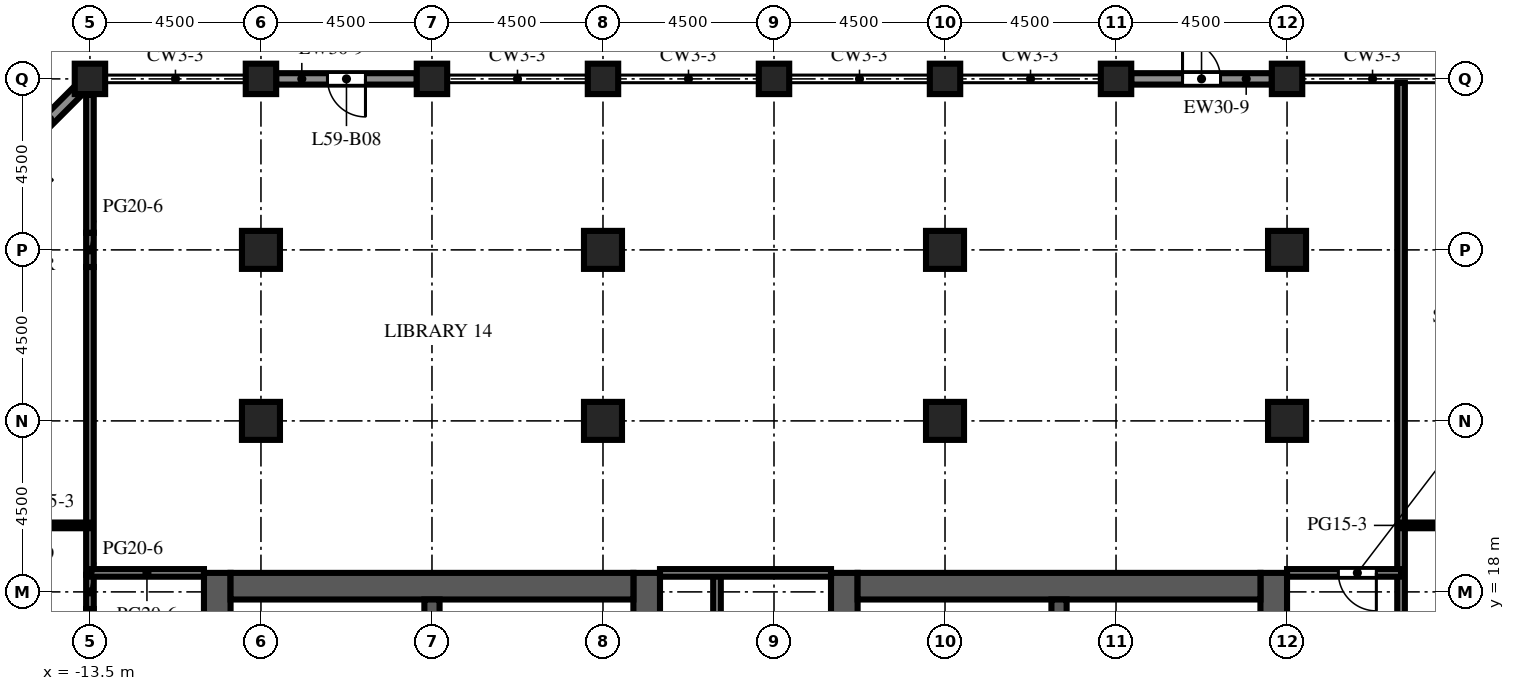
"""IFC4 building model, lengths in metres.
Left out: names, types, materials, properties, quantities, classifications, styles, units other than length and angle.
Written with IfcOpenShell. Run it as: python <this file> out.ifc"""

import sys

from ifc_helpers import new_model, si_unit, direction, frame, frame_2d, origin, origin_2d, place, context, subcontext, project, spatial, rectangle, extrude, element, fill, save


model = new_model("IFC4")
c1 = context("Model", 3, precision=1e-05, world=origin(), true_north=direction((0.0, 1.0)))
c2 = subcontext(c1, "Body", "Model", "MODEL_VIEW")
j1 = project(units=[si_unit("LENGTHUNIT", "METRE"), si_unit("PLANEANGLEUNIT", "RADIAN")], contexts=[c1])
p1 = place(None, origin())
s1 = spatial("IfcSite", under=j1, at=p1, CompositionType="ELEMENT")
p2 = place(p1, origin())
s2 = spatial("IfcBuilding", under=s1, at=p2, CompositionType="ELEMENT")
p3 = place(p2, frame((0.0, 0.0, 260.3)))
s3 = spatial("IfcBuildingStorey", under=s2, at=p3, CompositionType="ELEMENT", Elevation=260.3)
for number, where, z_axis, x_axis in (
    (1, (-13.5, 31.5, 0.0), (0.0, 0.0, 1.0), (1.0, 0.0, 0.0)),
    (2, (-9.0, 31.5, 0.0), (0.0, 0.0, 1.0), (1.0, 0.0, 0.0)),
    (3, (-4.5, 31.5, 0.0), (0.0, 0.0, 1.0), (1.0, 0.0, 0.0)),
    (4, (0.0, 31.5, 0.0), (0.0, 0.0, 1.0), (1.0, 0.0, 0.0)),
    (5, (4.5, 31.5, 0.0), (0.0, 0.0, 1.0), (1.0, 0.0, 0.0)),
    (6, (9.0, 31.5, 0.0), (0.0, 0.0, 1.0), (1.0, 0.0, 0.0)),
    (7, (13.5, 31.5, 0.0), (0.0, 0.0, 1.0), (1.0, 0.0, 0.0)),
    (8, (18.0, 31.5, 0.0), (0.0, 0.0, 1.0), (1.0, 0.0, 0.0)),
):
    element("IfcColumn", number, at=place(p3, frame(where, z_axis=z_axis, x_axis=x_axis)), inside=s3, PredefinedType="COLUMN", context=c2, shape_type="SweptSolid", body=[
        extrude(rectangle(XDim=0.8, YDim=0.8, at=origin_2d()), origin(), (0.0, 0.0, 1.0), 6.0),
    ])
p4 = place(p3, frame((-9.0, 22.5, 0.0), z_axis=(0.0, 0.0, 1.0), x_axis=(1.0, 0.0, 0.0)))
e9 = element("IfcColumn", 9, at=p4, inside=s3, PredefinedType="COLUMN", context=c2, shape_type="SweptSolid", body=[
    extrude(rectangle(XDim=1.0, YDim=1.0, at=origin_2d()), origin(), (0.0, 0.0, 1.0), 6.0),
])
p5 = place(p3, frame((-9.0, 27.0, 0.0), z_axis=(0.0, 0.0, 1.0), x_axis=(1.0, 0.0, 0.0)))
e10 = element("IfcColumn", 10, at=p5, inside=s3, PredefinedType="COLUMN", context=c2, shape_type="SweptSolid", body=[
    extrude(rectangle(XDim=1.0, YDim=1.0, at=origin_2d()), origin(), (0.0, 0.0, 1.0), 5.55),
])
p6 = place(p3, frame((0.0, 22.5, 0.0), z_axis=(0.0, 0.0, 1.0), x_axis=(1.0, 0.0, 0.0)))
e11 = element("IfcColumn", 11, at=p6, inside=s3, PredefinedType="COLUMN", context=c2, shape_type="SweptSolid", body=[
    extrude(rectangle(XDim=1.0, YDim=1.0, at=origin_2d()), origin(), (0.0, 0.0, 1.0), 6.0),
])
p7 = place(p3, frame((0.0, 27.0, 0.0), z_axis=(0.0, 0.0, 1.0), x_axis=(1.0, 0.0, 0.0)))
e12 = element("IfcColumn", 12, at=p7, inside=s3, PredefinedType="COLUMN", context=c2, shape_type="SweptSolid", body=[
    extrude(rectangle(XDim=1.0, YDim=1.0, at=origin_2d()), origin(), (0.0, 0.0, 1.0), 5.55),
])
p8 = place(p3, frame((9.0, 22.5, 0.0), z_axis=(0.0, 0.0, 1.0), x_axis=(1.0, 0.0, 0.0)))
e13 = element("IfcColumn", 13, at=p8, inside=s3, PredefinedType="COLUMN", context=c2, shape_type="SweptSolid", body=[
    extrude(rectangle(XDim=1.0, YDim=1.0, at=origin_2d()), origin(), (0.0, 0.0, 1.0), 6.0),
])
p9 = place(p3, frame((9.0, 27.0, 0.0), z_axis=(0.0, 0.0, 1.0), x_axis=(1.0, 0.0, 0.0)))
e14 = element("IfcColumn", 14, at=p9, inside=s3, PredefinedType="COLUMN", context=c2, shape_type="SweptSolid", body=[
    extrude(rectangle(XDim=1.0, YDim=1.0, at=origin_2d()), origin(), (0.0, 0.0, 1.0), 5.55),
])
p10 = place(p3, frame((18.0, 22.5, 0.0), z_axis=(0.0, 0.0, 1.0), x_axis=(1.0, 0.0, 0.0)))
e15 = element("IfcColumn", 15, at=p10, inside=s3, PredefinedType="COLUMN", context=c2, shape_type="SweptSolid", body=[
    extrude(rectangle(XDim=1.0, YDim=1.0, at=origin_2d()), origin(), (0.0, 0.0, 1.0), 6.0),
])
p11 = place(p3, frame((18.0, 27.0, 0.0), z_axis=(0.0, 0.0, 1.0), x_axis=(1.0, 0.0, 0.0)))
e16 = element("IfcColumn", 16, at=p11, inside=s3, PredefinedType="COLUMN", context=c2, shape_type="SweptSolid", body=[
    extrude(rectangle(XDim=1.0, YDim=1.0, at=origin_2d()), origin(), (0.0, 0.0, 1.0), 5.55),
])
p12 = place(p3, frame((-10.15, -9.0, 0.0), z_axis=(0.0, 0.0, 1.0), x_axis=(0.0, 1.0, 0.0)))
e17 = element("IfcWall", 17, at=p12, inside=s3, PredefinedType="SHEAR", context=c2, shape_type="SweptSolid", body=[
    extrude(rectangle(XDim=27.5, YDim=0.7, at=frame_2d((13.75, 0.0))), origin(), (0.0, 0.0, 1.0), 6.0),
])
p13 = place(p12, frame((12.55, 0.0, 0.0)))
e18 = element("IfcOpeningElement", 18, at=p13, cuts=e17, PredefinedType="OPENING", context=c2, shape_type="SweptSolid", body=[
    extrude(rectangle(XDim=2.4, YDim=2.4, at=frame_2d((1.2, 1.2))), frame((0.0, 0.36, 0.0), z_axis=(0.0, -1.0, 0.0), x_axis=(1.0, 0.0, 0.0)), (0.0, 0.0, 1.0), 0.72),
])
p14 = place(p12, frame((6.825, 0.0, 0.0)))
e19 = element("IfcOpeningElement", 19, at=p14, cuts=e17, PredefinedType="OPENING", context=c2, shape_type="SweptSolid", body=[
    extrude(rectangle(XDim=1.2, YDim=2.1, at=frame_2d((0.6, 1.05))), frame((0.0, 0.36, 0.0), z_axis=(0.0, -1.0, 0.0), x_axis=(1.0, 0.0, 0.0)), (0.0, 0.0, 1.0), 0.72),
])
p15 = place(p12, frame((19.475, 0.0, 0.0)))
e20 = element("IfcOpeningElement", 20, at=p15, cuts=e17, PredefinedType="OPENING", context=c2, shape_type="SweptSolid", body=[
    extrude(rectangle(XDim=1.2, YDim=2.1, at=frame_2d((0.6, 1.05))), frame((0.0, 0.36, 0.0), z_axis=(0.0, -1.0, 0.0), x_axis=(1.0, 0.0, 0.0)), (0.0, 0.0, 1.0), 0.72),
])
p16 = place(p3, frame((1.15, -9.0, 0.0), z_axis=(0.0, 0.0, 1.0), x_axis=(0.0, 1.0, 0.0)))
e21 = element("IfcWall", 21, at=p16, inside=s3, PredefinedType="SHEAR", context=c2, shape_type="SweptSolid", body=[
    extrude(rectangle(XDim=27.5, YDim=0.7, at=frame_2d((13.75, 0.0))), origin(), (0.0, 0.0, 1.0), 6.0),
])
p17 = place(p16, frame((12.55, 0.0, 0.0)))
e22 = element("IfcOpeningElement", 22, at=p17, cuts=e21, PredefinedType="OPENING", context=c2, shape_type="SweptSolid", body=[
    extrude(rectangle(XDim=2.4, YDim=2.4, at=frame_2d((1.2, 1.2))), frame((0.0, 0.36, 0.0), z_axis=(0.0, -1.0, 0.0), x_axis=(1.0, 0.0, 0.0)), (0.0, 0.0, 1.0), 0.72),
])
p18 = place(p16, frame((3.788, 0.0, 0.0)))
e23 = element("IfcOpeningElement", 23, at=p18, cuts=e21, PredefinedType="OPENING", context=c2, shape_type="SweptSolid", body=[
    extrude(rectangle(XDim=0.968, YDim=2.1, at=frame_2d((0.484, 1.05))), frame((0.0, 0.36, 0.0), z_axis=(0.0, -1.0, 0.0), x_axis=(1.0, 0.0, 0.0)), (0.0, 0.0, 1.0), 0.72),
])
p19 = place(p16, frame((23.54, 0.0, 0.0)))
e24 = element("IfcOpeningElement", 24, at=p19, cuts=e21, PredefinedType="OPENING", context=c2, shape_type="SweptSolid", body=[
    extrude(rectangle(XDim=1.2, YDim=2.1, at=frame_2d((0.6, 1.05))), frame((0.0, 0.36, 0.0), z_axis=(0.0, -1.0, 0.0), x_axis=(1.0, 0.0, 0.0)), (0.0, 0.0, 1.0), 0.72),
])
p20 = place(p3, frame((-9.8, 18.15, 0.0), z_axis=(0.0, 0.0, 1.0), x_axis=(1.0, 0.0, 0.0)))
e25 = element("IfcWall", 25, at=p20, inside=s3, PredefinedType="SHEAR", context=c2, shape_type="SweptSolid", body=[
    extrude(rectangle(XDim=10.6, YDim=0.7, at=frame_2d((5.3, 0.0))), origin(), (0.0, 0.0, 1.0), 6.0),
])
p21 = place(p3, frame((-4.5, 10.2, 0.0), z_axis=(0.0, 0.0, 1.0), x_axis=(0.0, 1.0, 0.0)))
e26 = element("IfcWall", 26, at=p21, inside=s3, PredefinedType="SHEAR", context=c2, shape_type="SweptSolid", body=[
    extrude(rectangle(XDim=7.6, YDim=0.4, at=frame_2d((3.8, 0.0))), origin(), (0.0, 0.0, 1.0), 6.0),
])
p22 = place(p3, frame((6.35, -9.0, 0.0), z_axis=(0.0, 0.0, 1.0), x_axis=(0.0, 1.0, 0.0)))
e27 = element("IfcWall", 27, at=p22, inside=s3, PredefinedType="SHEAR", context=c2, shape_type="SweptSolid", body=[
    extrude(rectangle(XDim=27.5, YDim=0.7, at=frame_2d((13.75, 0.0))), origin(), (0.0, 0.0, 1.0), 6.0),
])
p23 = place(p22, frame((12.55, 0.0, 0.0)))
e28 = element("IfcOpeningElement", 28, at=p23, cuts=e27, PredefinedType="OPENING", context=c2, shape_type="SweptSolid", body=[
    extrude(rectangle(XDim=2.4, YDim=2.4, at=frame_2d((1.2, 1.2))), frame((0.0, 0.36, 0.0), z_axis=(0.0, -1.0, 0.0), x_axis=(1.0, 0.0, 0.0)), (0.0, 0.0, 1.0), 0.72),
])
p24 = place(p22, frame((3.788, 0.0, 0.0)))
e29 = element("IfcOpeningElement", 29, at=p24, cuts=e27, PredefinedType="OPENING", context=c2, shape_type="SweptSolid", body=[
    extrude(rectangle(XDim=0.968, YDim=2.1, at=frame_2d((0.484, 1.05))), frame((0.0, 0.36, 0.0), z_axis=(0.0, -1.0, 0.0), x_axis=(1.0, 0.0, 0.0)), (0.0, 0.0, 1.0), 0.72),
])
p25 = place(p22, frame((23.54, 0.0, 0.0)))
e30 = element("IfcOpeningElement", 30, at=p25, cuts=e27, PredefinedType="OPENING", context=c2, shape_type="SweptSolid", body=[
    extrude(rectangle(XDim=1.2, YDim=2.1, at=frame_2d((0.6, 1.05))), frame((0.0, 0.36, 0.0), z_axis=(0.0, -1.0, 0.0), x_axis=(1.0, 0.0, 0.0)), (0.0, 0.0, 1.0), 0.72),
])
p26 = place(p3, frame((17.65, -9.0, 0.0), z_axis=(0.0, 0.0, 1.0), x_axis=(0.0, 1.0, 0.0)))
e31 = element("IfcWall", 31, at=p26, inside=s3, PredefinedType="SHEAR", context=c2, shape_type="SweptSolid", body=[
    extrude(rectangle(XDim=27.5, YDim=0.7, at=frame_2d((13.75, 0.0))), origin(), (0.0, 0.0, 1.0), 6.0),
])
p27 = place(p26, frame((12.55, 0.0, 0.0)))
e32 = element("IfcOpeningElement", 32, at=p27, cuts=e31, PredefinedType="OPENING", context=c2, shape_type="SweptSolid", body=[
    extrude(rectangle(XDim=2.4, YDim=2.4, at=frame_2d((1.2, 1.2))), frame((0.0, 0.36, 0.0), z_axis=(0.0, -1.0, 0.0), x_axis=(1.0, 0.0, 0.0)), (0.0, 0.0, 1.0), 0.72),
])
p28 = place(p26, frame((6.825, 0.0, 0.0)))
e33 = element("IfcOpeningElement", 33, at=p28, cuts=e31, PredefinedType="OPENING", context=c2, shape_type="SweptSolid", body=[
    extrude(rectangle(XDim=1.2, YDim=2.1, at=frame_2d((0.6, 1.05))), frame((0.0, 0.36, 0.0), z_axis=(0.0, -1.0, 0.0), x_axis=(1.0, 0.0, 0.0)), (0.0, 0.0, 1.0), 0.72),
])
p29 = place(p26, frame((19.475, 0.0, 0.0)))
e34 = element("IfcOpeningElement", 34, at=p29, cuts=e31, PredefinedType="OPENING", context=c2, shape_type="SweptSolid", body=[
    extrude(rectangle(XDim=1.2, YDim=2.1, at=frame_2d((0.6, 1.05))), frame((0.0, 0.36, 0.0), z_axis=(0.0, -1.0, 0.0), x_axis=(1.0, 0.0, 0.0)), (0.0, 0.0, 1.0), 0.72),
])
p30 = place(p3, frame((6.7, 18.15, 0.0), z_axis=(0.0, 0.0, 1.0), x_axis=(1.0, 0.0, 0.0)))
e35 = element("IfcWall", 35, at=p30, inside=s3, PredefinedType="SHEAR", context=c2, shape_type="SweptSolid", body=[
    extrude(rectangle(XDim=10.6, YDim=0.7, at=frame_2d((5.3, 0.0))), origin(), (0.0, 0.0, 1.0), 6.0),
])
p31 = place(p3, frame((12.0, 10.2, 0.0), z_axis=(0.0, 0.0, 1.0), x_axis=(0.0, 1.0, 0.0)))
e36 = element("IfcWall", 36, at=p31, inside=s3, PredefinedType="SHEAR", context=c2, shape_type="SweptSolid", body=[
    extrude(rectangle(XDim=7.6, YDim=0.4, at=frame_2d((3.8, 0.0))), origin(), (0.0, 0.0, 1.0), 6.0),
])
p32 = place(p3, frame((13.9, 31.5, 0.0), z_axis=(0.0, 0.0, 1.0), x_axis=(1.0, 0.0, 0.0)))
e37 = element("IfcWall", 37, at=p32, inside=s3, PredefinedType="SOLIDWALL", context=c2, shape_type="SweptSolid", body=[
    extrude(rectangle(XDim=3.7, YDim=0.3, at=frame_2d((1.85, 0.0))), origin(), (0.0, 0.0, 1.0), 4.75),
])
p33 = place(p32, frame((1.35, 0.0, 0.0)))
e38 = element("IfcOpeningElement", 38, at=p33, cuts=e37, PredefinedType="OPENING", context=c2, shape_type="SweptSolid", body=[
    extrude(rectangle(XDim=1.0, YDim=2.2, at=frame_2d((0.5, 1.1))), frame((0.0, 0.16, 0.0), z_axis=(0.0, -1.0, 0.0), x_axis=(1.0, 0.0, 0.0)), (0.0, 0.0, 1.0), 0.32),
])
p34 = place(p3, frame((-8.6, 31.5, 0.0), z_axis=(0.0, 0.0, 1.0), x_axis=(1.0, 0.0, 0.0)))
e39 = element("IfcWall", 39, at=p34, inside=s3, PredefinedType="SOLIDWALL", context=c2, shape_type="SweptSolid", body=[
    extrude(rectangle(XDim=3.7, YDim=0.3, at=frame_2d((1.85, 0.0))), origin(), (0.0, 0.0, 1.0), 4.75),
])
p35 = place(p34, frame((1.35, 0.0, 0.0)))
e40 = element("IfcOpeningElement", 40, at=p35, cuts=e39, PredefinedType="OPENING", context=c2, shape_type="SweptSolid", body=[
    extrude(rectangle(XDim=1.0, YDim=2.2, at=frame_2d((0.5, 1.1))), frame((0.0, 0.16, 0.0), z_axis=(0.0, -1.0, 0.0), x_axis=(1.0, 0.0, 0.0)), (0.0, 0.0, 1.0), 0.32),
])
p36 = place(p3, frame((-17.706, 27.294, 0.0), z_axis=(0.0, 0.0, 1.0), x_axis=(0.707106781187, 0.707106781187, 0.0)))
e41 = element("IfcWall", 41, at=p36, inside=s3, PredefinedType="SOLIDWALL", context=c2, shape_type="SweptSolid", body=[
    extrude(rectangle(XDim=5.532, YDim=0.3, at=frame_2d((2.766, 0.0))), origin(), (0.0, 0.0, 1.0), 3.75),
])
p37 = place(p36, frame((2.166, 0.0, 0.0)))
e42 = element("IfcOpeningElement", 42, at=p37, cuts=e41, PredefinedType="OPENING", context=c2, shape_type="SweptSolid", body=[
    extrude(rectangle(XDim=1.2, YDim=2.2, at=frame_2d((0.6, 1.1))), frame((0.0, 0.16, 0.0), z_axis=(0.0, -1.0, 0.0), x_axis=(1.0, 0.0, 0.0)), (0.0, 0.0, 1.0), 0.32),
])
p38 = place(p3, frame((-0.5, 15.14, 0.0), z_axis=(0.0, 0.0, 1.0), x_axis=(0.0, 1.0, 0.0)))
e43 = element("IfcWall", 43, at=p38, inside=s3, PredefinedType="PARTITIONING", context=c2, shape_type="SweptSolid", body=[
    extrude(rectangle(XDim=2.66, YDim=0.1, at=frame_2d((1.33, 0.0))), origin(), (0.0, 0.0, 1.0), 5.55),
])
p39 = place(p38, frame((0.83, 0.0, 0.0)))
e44 = element("IfcOpeningElement", 44, at=p39, cuts=e43, PredefinedType="OPENING", context=c2, shape_type="SweptSolid", body=[
    extrude(rectangle(XDim=1.0, YDim=2.1, at=frame_2d((0.5, 1.05))), frame((0.0, 0.06, 0.0), z_axis=(0.0, -1.0, 0.0), x_axis=(1.0, 0.0, 0.0)), (0.0, 0.0, 1.0), 0.12),
])
p40 = place(p3, frame((8.0, 15.14, 0.0), z_axis=(0.0, 0.0, 1.0), x_axis=(0.0, 1.0, 0.0)))
e45 = element("IfcWall", 45, at=p40, inside=s3, PredefinedType="PARTITIONING", context=c2, shape_type="SweptSolid", body=[
    extrude(rectangle(XDim=2.66, YDim=0.1, at=frame_2d((1.33, 0.0))), origin(), (0.0, 0.0, 1.0), 5.55),
])
p41 = place(p40, frame((0.83, 0.0, 0.0)))
e46 = element("IfcOpeningElement", 46, at=p41, cuts=e45, PredefinedType="OPENING", context=c2, shape_type="SweptSolid", body=[
    extrude(rectangle(XDim=1.0, YDim=2.1, at=frame_2d((0.5, 1.05))), frame((0.0, 0.06, 0.0), z_axis=(0.0, -1.0, 0.0), x_axis=(1.0, 0.0, 0.0)), (0.0, 0.0, 1.0), 0.12),
])
p42 = place(p3, frame((-13.5, 9.45, 0.0), z_axis=(0.0, 0.0, 1.0), x_axis=(0.0, 1.0, 0.0)))
e47 = element("IfcWall", 47, at=p42, inside=s3, PredefinedType="PARTITIONING", context=c2, shape_type="SweptSolid", body=[
    extrude(rectangle(XDim=8.1, YDim=0.2, at=frame_2d((4.05, 0.0))), origin(), (0.0, 0.0, 1.0), 5.55),
])
p43 = place(p42, frame((1.65, 0.0, 0.0)))
e48 = element("IfcOpeningElement", 48, at=p43, cuts=e47, PredefinedType="OPENING", context=c2, shape_type="SweptSolid", body=[
    extrude(rectangle(XDim=1.0, YDim=2.1, at=frame_2d((0.5, 1.05))), frame((0.0, 0.11, 0.0), z_axis=(0.0, -1.0, 0.0), x_axis=(1.0, 0.0, 0.0)), (0.0, 0.0, 1.0), 0.22),
])
p44 = place(p3, frame((-13.5, 17.55, 0.0), z_axis=(0.0, 0.0, 1.0), x_axis=(0.0, 1.0, 0.0)))
e49 = element("IfcWall", 49, at=p44, inside=s3, PredefinedType="PARTITIONING", context=c2, shape_type="SweptSolid", body=[
    extrude(rectangle(XDim=0.9, YDim=0.2, at=frame_2d((0.45, 0.0))), origin(), (0.0, 0.0, 1.0), 3.72),
])
p45 = place(p3, frame((-13.5, 18.45, 0.0), z_axis=(0.0, 0.0, 1.0), x_axis=(0.0, 1.0, 0.0)))
e50 = element("IfcWall", 50, at=p45, inside=s3, PredefinedType="PARTITIONING", context=c2, shape_type="SweptSolid", body=[
    extrude(rectangle(XDim=8.1, YDim=0.2, at=frame_2d((4.05, 0.0))), origin(), (0.0, 0.0, 1.0), 5.55),
])
p46 = place(p3, frame((-13.5, 26.55, 0.0), z_axis=(0.0, 0.0, 1.0), x_axis=(0.0, 1.0, 0.0)))
e51 = element("IfcWall", 51, at=p46, inside=s3, PredefinedType="PARTITIONING", context=c2, shape_type="SweptSolid", body=[
    extrude(rectangle(XDim=0.9, YDim=0.2, at=frame_2d((0.45, 0.0))), origin(), (0.0, 0.0, 1.0), 3.72),
])
p47 = place(p3, frame((-13.5, 27.45, 0.0), z_axis=(0.0, 0.0, 1.0), x_axis=(0.0, 1.0, 0.0)))
e52 = element("IfcWall", 52, at=p47, inside=s3, PredefinedType="PARTITIONING", context=c2, shape_type="SweptSolid", body=[
    extrude(rectangle(XDim=3.627, YDim=0.2, at=frame_2d((1.813, 0.0))), origin(), (0.0, 0.0, 1.0), 5.55),
])
p48 = place(p3, frame((3.0, 6.7, 0.0), z_axis=(0.0, 0.0, 1.0), x_axis=(0.0, 1.0, 0.0)))
e53 = element("IfcWall", 53, at=p48, inside=s3, PredefinedType="PARTITIONING", context=c2, shape_type="SweptSolid", body=[
    extrude(rectangle(XDim=11.8, YDim=0.2, at=frame_2d((5.9, 0.0))), origin(), (0.0, 0.0, 1.0), 5.55),
])
p49 = place(p48, frame((5.6, 0.0, 0.0)))
e54 = element("IfcOpeningElement", 54, at=p49, cuts=e53, PredefinedType="OPENING", context=c2, shape_type="SweptSolid", body=[
    extrude(rectangle(XDim=1.0, YDim=2.1, at=frame_2d((0.5, 1.05))), frame((0.0, 0.11, 0.0), z_axis=(0.0, -1.0, 0.0), x_axis=(1.0, 0.0, 0.0)), (0.0, 0.0, 1.0), 0.22),
])
p50 = place(p3, frame((21.0, 31.4, 0.0), z_axis=(0.0, 0.0, 1.0), x_axis=(0.0, -1.0, 0.0)))
e55 = element("IfcWall", 55, at=p50, inside=s3, PredefinedType="PARTITIONING", context=c2, shape_type="SweptSolid", body=[
    extrude(rectangle(XDim=25.15, YDim=0.2, at=frame_2d((12.575, 0.0))), origin(), (0.0, 0.0, 1.0), 5.55),
])
p51 = place(p50, frame((16.8, 0.0, 0.0)))
e56 = element("IfcOpeningElement", 56, at=p51, cuts=e55, PredefinedType="OPENING", context=c2, shape_type="SweptSolid", body=[
    extrude(rectangle(XDim=1.0, YDim=2.1, at=frame_2d((0.5, 1.05))), frame((0.0, 0.11, 0.0), z_axis=(0.0, -1.0, 0.0), x_axis=(1.0, 0.0, 0.0)), (0.0, 0.0, 1.0), 0.22),
])
p52 = place(p3, frame((-13.5, 18.5, 0.0), z_axis=(0.0, 0.0, 1.0), x_axis=(1.0, 0.0, 0.0)))
e57 = element("IfcWall", 57, at=p52, inside=s3, PredefinedType="PARTITIONING", context=c2, shape_type="SweptSolid", body=[
    extrude(rectangle(XDim=3.0, YDim=0.2, at=frame_2d((1.5, 0.0))), origin(), (0.0, 0.0, 1.0), 3.72),
])
p53 = place(p3, frame((1.5, 18.5, 0.0), z_axis=(0.0, 0.0, 1.0), x_axis=(1.0, 0.0, 0.0)))
e58 = element("IfcWall", 58, at=p53, inside=s3, PredefinedType="PARTITIONING", context=c2, shape_type="SweptSolid", body=[
    extrude(rectangle(XDim=4.5, YDim=0.2, at=frame_2d((2.25, 0.0))), origin(), (0.0, 0.0, 1.0), 5.55),
])
p54 = place(p3, frame((18.0, 18.5, 0.0), z_axis=(0.0, 0.0, 1.0), x_axis=(1.0, 0.0, 0.0)))
e59 = element("IfcWall", 59, at=p54, inside=s3, PredefinedType="PARTITIONING", context=c2, shape_type="SweptSolid", body=[
    extrude(rectangle(XDim=3.0, YDim=0.2, at=frame_2d((1.5, 0.0))), origin(), (0.0, 0.0, 1.0), 5.55),
])
p55 = place(p54, frame((1.35, 0.0, 0.0)))
e60 = element("IfcOpeningElement", 60, at=p55, cuts=e59, PredefinedType="OPENING", context=c2, shape_type="SweptSolid", body=[
    extrude(rectangle(XDim=1.0, YDim=2.1, at=frame_2d((0.5, 1.05))), frame((0.0, 0.11, 0.0), z_axis=(0.0, -1.0, 0.0), x_axis=(1.0, 0.0, 0.0)), (0.0, 0.0, 1.0), 0.22),
])
p56 = place(p3, frame((-17.85, 19.75, 0.0), z_axis=(0.0, 0.0, 1.0), x_axis=(1.0, 0.0, 0.0)))
e61 = element("IfcWall", 61, at=p56, inside=s3, PredefinedType="PARTITIONING", context=c2, shape_type="SweptSolid", body=[
    extrude(rectangle(XDim=4.35, YDim=0.15, at=frame_2d((2.175, 0.0))), origin(), (0.0, 0.0, 1.0), 5.55),
])
p57 = place(p56, frame((0.95, 0.0, 0.0)))
e62 = element("IfcOpeningElement", 62, at=p57, cuts=e61, PredefinedType="OPENING", context=c2, shape_type="SweptSolid", body=[
    extrude(rectangle(XDim=1.0, YDim=2.1, at=frame_2d((0.5, 1.05))), frame((0.0, 0.085, 0.0), z_axis=(0.0, -1.0, 0.0), x_axis=(1.0, 0.0, 0.0)), (0.0, 0.0, 1.0), 0.17),
])
p58 = place(p3, frame((21.0, 19.75, 0.0), z_axis=(0.0, 0.0, 1.0), x_axis=(1.0, 0.0, 0.0)))
e63 = element("IfcWall", 63, at=p58, inside=s3, PredefinedType="PARTITIONING", context=c2, shape_type="SweptSolid", body=[
    extrude(rectangle(XDim=1.05, YDim=0.15, at=frame_2d((0.525, 0.0))), origin(), (0.0, 0.0, 1.0), 5.55),
])
p59 = place(p33, origin())
e64 = element("IfcDoor", 64, at=p59, inside=s3, OperationType="SINGLE_SWING_LEFT", PredefinedType="DOOR", context=c2, shape_type="SweptSolid", body=[
    extrude(rectangle(XDim=1.0, YDim=2.2, at=frame_2d((0.5, 1.1))), frame((0.0, 0.025, 0.0), z_axis=(0.0, -1.0, 0.0), x_axis=(1.0, 0.0, 0.0)), (0.0, 0.0, 1.0), 0.05),
])
fill(e38, e64)
p60 = place(p35, origin())
e65 = element("IfcDoor", 65, at=p60, inside=s3, OperationType="SINGLE_SWING_RIGHT", PredefinedType="DOOR", context=c2, shape_type="SweptSolid", body=[
    extrude(rectangle(XDim=1.0, YDim=2.2, at=frame_2d((0.5, 1.1))), frame((0.0, 0.025, 0.0), z_axis=(0.0, -1.0, 0.0), x_axis=(1.0, 0.0, 0.0)), (0.0, 0.0, 1.0), 0.05),
])
fill(e40, e65)
p61 = place(p55, origin())
e66 = element("IfcDoor", 66, at=p61, inside=s3, OperationType="SINGLE_SWING_RIGHT", PredefinedType="DOOR", context=c2, shape_type="SweptSolid", body=[
    extrude(rectangle(XDim=1.0, YDim=2.1, at=frame_2d((0.5, 1.05))), frame((0.0, 0.025, 0.0), z_axis=(0.0, -1.0, 0.0), x_axis=(1.0, 0.0, 0.0)), (0.0, 0.0, 1.0), 0.05),
])
fill(e60, e66)
save(model, sys.argv[1])
